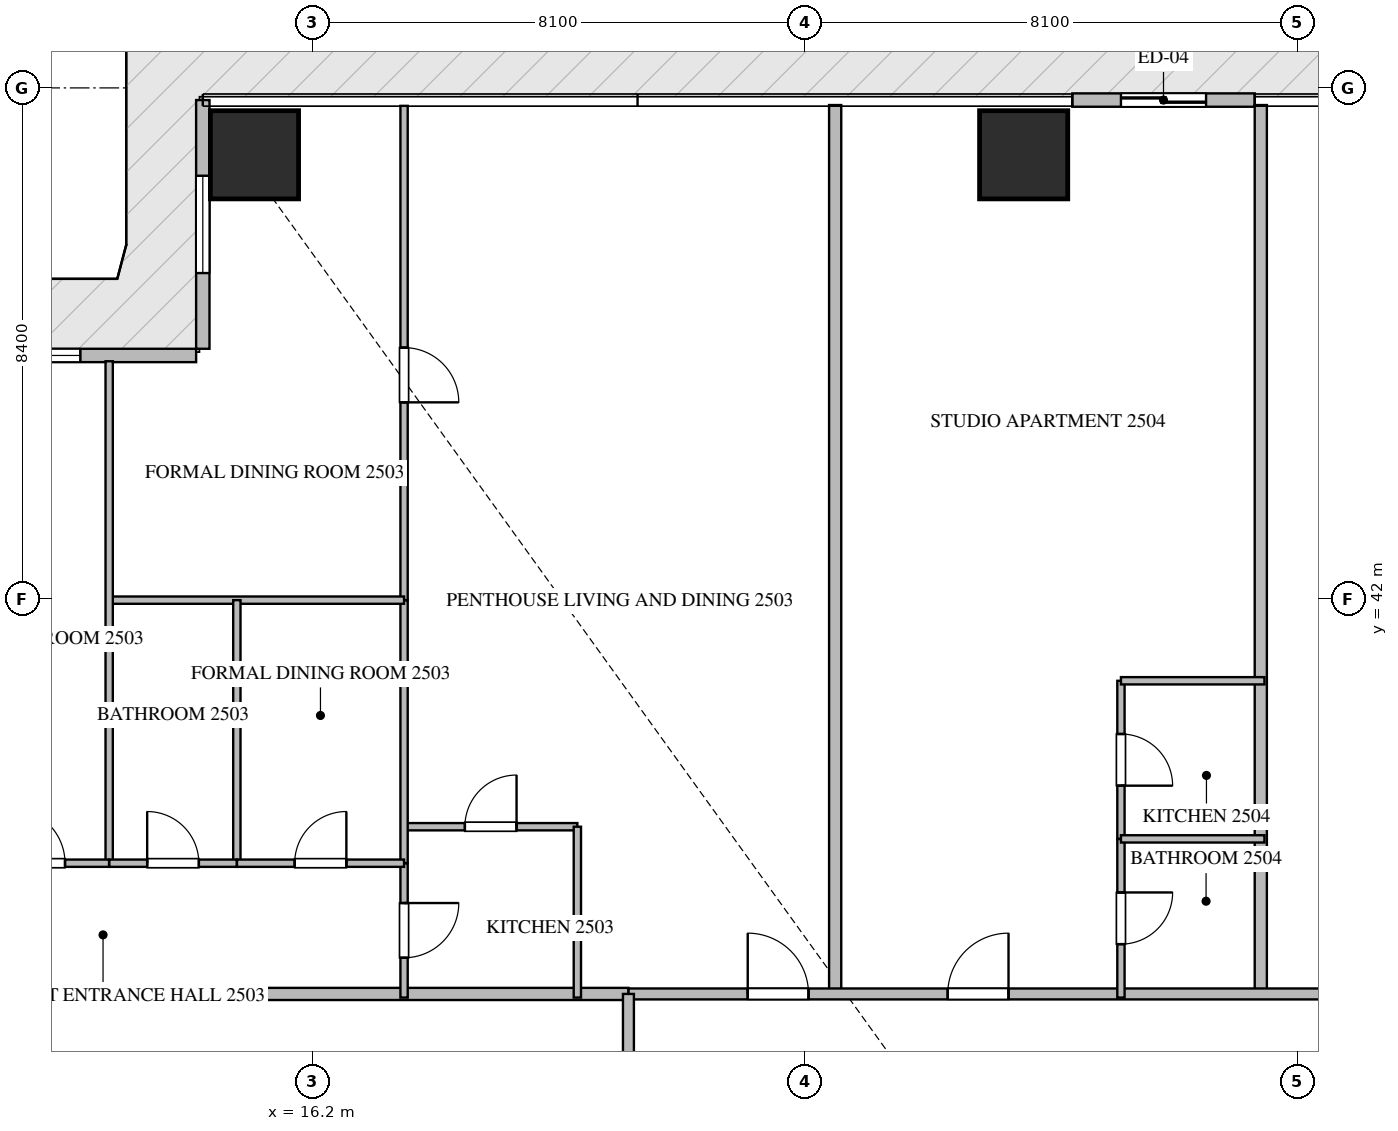
"""IFC4 building model, lengths in metres.
Left out: names, types, materials, properties, quantities, classifications, styles, units other than length and angle.
Written with IfcOpenShell. Run it as: python <this file> out.ifc"""

import sys

from ifc_helpers import new_model, si_unit, direction, frame, frame_2d, origin, origin_2d, place, context, subcontext, project, spatial, rectangle, extrude, source, transform, mapped, element, fill, save


model = new_model("IFC4")
c1 = context("Model", 3, precision=1e-05, world=origin(), true_north=direction((0.0, 1.0)))
c2 = subcontext(c1, "Body", "Model", "MODEL_VIEW")
j1 = project(units=[si_unit("LENGTHUNIT", "METRE"), si_unit("PLANEANGLEUNIT", "RADIAN")], contexts=[c1])
p1 = place(None, origin())
s1 = spatial("IfcSite", under=j1, at=p1, CompositionType="ELEMENT")
p2 = place(p1, origin())
s2 = spatial("IfcBuilding", under=s1, at=p2, CompositionType="ELEMENT")
p3 = place(p2, frame((0.0, 0.0, 101.7)))
s3 = spatial("IfcBuildingStorey", under=s2, at=p3, CompositionType="ELEMENT", Elevation=101.7)
m1 = source(origin(), c2, "Body", "SweptSolid", [
    extrude(rectangle(XDim=1.45, YDim=1.45, at=origin_2d()), origin(), (0.0, 0.0, 1.0), 3.75),
])
for number, where, z_axis, x_axis in (
    (1, (15.25, 49.3, -0.26), (0.0, 0.0, 1.0), (1.0, 0.0, 0.0)),
    (2, (27.9, 49.3, -0.26), (0.0, 0.0, 1.0), (1.0, 0.0, 0.0)),
):
    element("IfcColumn", number, at=place(p3, frame(where, z_axis=z_axis, x_axis=x_axis)), inside=s3, PredefinedType="COLUMN", context=c2, shape_type="MappedRepresentation", body=[
        mapped(m1, transform((0.0, 0.0, 0.0), scale=1.0)),
    ])
p4 = place(p3, frame((31.7, 50.2, 0.0), z_axis=(0.0, 0.0, 1.0), x_axis=(-1.0, 0.0, 0.0)))
e3 = element("IfcWall", 3, at=p4, inside=s3, PredefinedType="ELEMENTEDWALL", context=c2, shape_type="SweptSolid", body=[
    extrude(rectangle(XDim=3.0, YDim=0.22, at=frame_2d((1.5, 0.0))), origin(), (0.0, 0.0, 1.0), 3.475),
])
p5 = place(p4, frame((0.8, 0.0, 0.0)))
e4 = element("IfcOpeningElement", 4, at=p5, cuts=e3, PredefinedType="OPENING", context=c2, shape_type="SweptSolid", body=[
    extrude(rectangle(XDim=1.4, YDim=2.25, at=frame_2d((0.7, 1.125))), frame((0.0, 0.12, 0.0), z_axis=(0.0, -1.0, 0.0), x_axis=(1.0, 0.0, 0.0)), (0.0, 0.0, 1.0), 0.24),
])
p6 = place(p3, frame((14.4, 50.2, 0.0), z_axis=(0.0, 0.0, 1.0), x_axis=(0.0, -1.0, 0.0)))
e5 = element("IfcWall", 5, at=p6, inside=s3, PredefinedType="ELEMENTEDWALL", context=c2, shape_type="SweptSolid", body=[
    extrude(rectangle(XDim=4.09, YDim=0.22, at=frame_2d((2.045, 0.0))), origin(), (0.0, 0.0, 1.0), 3.475),
])
p7 = place(p6, frame((1.245, 0.0, 0.65)))
e6 = element("IfcOpeningElement", 6, at=p7, cuts=e5, PredefinedType="OPENING", context=c2, shape_type="SweptSolid", body=[
    extrude(rectangle(XDim=1.6, YDim=2.1, at=frame_2d((0.8, 1.05))), frame((0.0, 0.12, 0.0), z_axis=(0.0, -1.0, 0.0), x_axis=(1.0, 0.0, 0.0)), (0.0, 0.0, 1.0), 0.24),
])
p8 = place(p3, frame((14.29, 46.0, 0.0), z_axis=(0.0, 0.0, 1.0), x_axis=(-1.0, 0.0, 0.0)))
e7 = element("IfcWall", 7, at=p8, inside=s3, PredefinedType="ELEMENTEDWALL", context=c2, shape_type="SweptSolid", body=[
    extrude(rectangle(XDim=3.98, YDim=0.22, at=frame_2d((1.99, 0.0))), origin(), (0.0, 0.0, 1.0), 3.475),
])
p9 = place(p8, frame((1.904, 0.0, 0.65)))
e8 = element("IfcOpeningElement", 8, at=p9, cuts=e7, PredefinedType="OPENING", context=c2, shape_type="SweptSolid", body=[
    extrude(rectangle(XDim=1.6, YDim=2.1, at=frame_2d((0.8, 1.05))), frame((0.0, 0.12, 0.0), z_axis=(0.0, -1.0, 0.0), x_axis=(1.0, 0.0, 0.0)), (0.0, 0.0, 1.0), 0.24),
])
for number, where, z_axis, x_axis in (
    (9, (24.8, 35.5, 0.0), (0.0, 0.0, 1.0), (0.0, 1.0, 0.0)),
    (10, (31.8, 35.5, 0.0), (0.0, 0.0, 1.0), (0.0, 1.0, 0.0)),
):
    element("IfcWall", number, at=place(p3, frame(where, z_axis=z_axis, x_axis=x_axis)), inside=s3, PredefinedType="PARTITIONING", context=c2, shape_type="SweptSolid", body=[
        extrude(rectangle(XDim=14.618, YDim=0.2, at=frame_2d((7.309, 0.0))), origin(), (0.0, 0.0, 1.0), 3.49),
    ])
p10 = place(p3, frame((6.082, 35.5, 0.0), z_axis=(0.0, 0.0, 1.0), x_axis=(1.0, 0.0, 0.0)))
e11 = element("IfcWall", 11, at=p10, inside=s3, PredefinedType="PARTITIONING", context=c2, shape_type="SweptSolid", body=[
    extrude(rectangle(XDim=15.318, YDim=0.2, at=frame_2d((7.659, 0.0))), origin(), (0.0, 0.0, 1.0), 3.49),
])
p11 = place(p3, frame((21.402, 35.5, 0.0), z_axis=(0.0, 0.0, 1.0), x_axis=(1.0, 0.0, 0.0)))
e12 = element("IfcWall", 12, at=p11, inside=s3, PredefinedType="PARTITIONING", context=c2, shape_type="SweptSolid", body=[
    extrude(rectangle(XDim=21.996, YDim=0.18, at=frame_2d((10.998, 0.0))), origin(), (0.0, 0.0, 1.0), 3.49),
])
p12 = place(p11, frame((1.96, 0.0, 0.0)))
e13 = element("IfcOpeningElement", 13, at=p12, cuts=e12, PredefinedType="OPENING", context=c2, shape_type="SweptSolid", body=[
    extrude(rectangle(XDim=1.0, YDim=2.15, at=frame_2d((0.5, 1.075))), frame((0.0, 0.1, 0.0), z_axis=(0.0, -1.0, 0.0), x_axis=(1.0, 0.0, 0.0)), (0.0, 0.0, 1.0), 0.2),
])
p13 = place(p11, frame((5.249, 0.0, 0.0)))
e14 = element("IfcOpeningElement", 14, at=p13, cuts=e12, PredefinedType="OPENING", context=c2, shape_type="SweptSolid", body=[
    extrude(rectangle(XDim=1.0, YDim=2.15, at=frame_2d((0.5, 1.075))), frame((0.0, 0.1, 0.0), z_axis=(0.0, -1.0, 0.0), x_axis=(1.0, 0.0, 0.0)), (0.0, 0.0, 1.0), 0.2),
])
p14 = place(p11, frame((11.653, 0.0, 0.0)))
e15 = element("IfcOpeningElement", 15, at=p14, cuts=e12, PredefinedType="OPENING", context=c2, shape_type="SweptSolid", body=[
    extrude(rectangle(XDim=1.0, YDim=2.15, at=frame_2d((0.5, 1.075))), frame((0.0, 0.1, 0.0), z_axis=(0.0, -1.0, 0.0), x_axis=(1.0, 0.0, 0.0)), (0.0, 0.0, 1.0), 0.2),
])
p15 = place(p11, frame((18.896, 0.0, 0.0)))
e16 = element("IfcOpeningElement", 16, at=p15, cuts=e12, PredefinedType="OPENING", context=c2, shape_type="SweptSolid", body=[
    extrude(rectangle(XDim=1.0, YDim=2.15, at=frame_2d((0.5, 1.075))), frame((0.0, 0.1, 0.0), z_axis=(0.0, -1.0, 0.0), x_axis=(1.0, 0.0, 0.0)), (0.0, 0.0, 1.0), 0.2),
])
p16 = place(p3, frame((21.4, 14.9, 0.0), z_axis=(0.0, 0.0, 1.0), x_axis=(0.0, 1.0, 0.0)))
e17 = element("IfcWall", 17, at=p16, inside=s3, PredefinedType="PARTITIONING", context=c2, shape_type="SweptSolid", body=[
    extrude(rectangle(XDim=20.6, YDim=0.18, at=frame_2d((10.3, 0.0))), origin(), (0.0, 0.0, 1.0), 3.49),
])
p17 = place(p16, frame((17.64, 0.0, 0.0)))
e18 = element("IfcOpeningElement", 18, at=p17, cuts=e17, PredefinedType="OPENING", context=c2, shape_type="SweptSolid", body=[
    extrude(rectangle(XDim=1.0, YDim=2.15, at=frame_2d((0.5, 1.075))), frame((0.0, 0.1, 0.0), z_axis=(0.0, -1.0, 0.0), x_axis=(1.0, 0.0, 0.0)), (0.0, 0.0, 1.0), 0.2),
])
p18 = place(p3, frame((17.71, 38.25, 0.0), z_axis=(0.0, 0.0, 1.0), x_axis=(1.0, 0.0, 0.0)))
e19 = element("IfcWall", 19, at=p18, inside=s3, PredefinedType="PARTITIONING", context=c2, shape_type="SweptSolid", body=[
    extrude(rectangle(XDim=2.85, YDim=0.12, at=frame_2d((1.425, 0.0))), origin(), (0.0, 0.0, 1.0), 3.49),
])
p19 = place(p18, frame((1.0, 0.0, 0.0)))
e20 = element("IfcOpeningElement", 20, at=p19, cuts=e19, PredefinedType="OPENING", context=c2, shape_type="SweptSolid", body=[
    extrude(rectangle(XDim=0.85, YDim=2.1, at=frame_2d((0.425, 1.05))), frame((0.0, 0.07, 0.0), z_axis=(0.0, -1.0, 0.0), x_axis=(1.0, 0.0, 0.0)), (0.0, 0.0, 1.0), 0.14),
])
p20 = place(p3, frame((20.56, 38.25, 0.0), z_axis=(0.0, 0.0, 1.0), x_axis=(0.0, -1.0, 0.0)))
e21 = element("IfcWall", 21, at=p20, inside=s3, PredefinedType="PARTITIONING", context=c2, shape_type="SweptSolid", body=[
    extrude(rectangle(XDim=2.81, YDim=0.12, at=frame_2d((1.405, 0.0))), origin(), (0.0, 0.0, 1.0), 3.49),
])
p21 = place(p3, frame((17.71, 37.65, 0.0), z_axis=(0.0, 0.0, 1.0), x_axis=(0.0, -1.0, 0.0)))
e22 = element("IfcWall", 22, at=p21, inside=s3, PredefinedType="PARTITIONING", context=c2, shape_type="SweptSolid", body=[
    extrude(rectangle(XDim=2.21, YDim=0.12, at=frame_2d((1.105, 0.0))), origin(), (0.0, 0.0, 1.0), 3.49),
])
p22 = place(p21, frame((0.655, 0.0, 0.0)))
e23 = element("IfcOpeningElement", 23, at=p22, cuts=e22, PredefinedType="OPENING", context=c2, shape_type="SweptSolid", body=[
    extrude(rectangle(XDim=0.9, YDim=2.1, at=frame_2d((0.45, 1.05))), frame((0.0, 0.07, 0.0), z_axis=(0.0, -1.0, 0.0), x_axis=(1.0, 0.0, 0.0)), (0.0, 0.0, 1.0), 0.14),
])
p23 = place(p3, frame((17.71, 50.105, 0.0), z_axis=(0.0, 0.0, 1.0), x_axis=(0.0, -1.0, 0.0)))
e24 = element("IfcWall", 24, at=p23, inside=s3, PredefinedType="PARTITIONING", context=c2, shape_type="SweptSolid", body=[
    extrude(rectangle(XDim=8.129, YDim=0.12, at=frame_2d((4.064, 0.0))), origin(), (0.0, 0.0, 1.0), 3.49),
])
p24 = place(p23, frame((3.976, 0.0, 0.0)))
e25 = element("IfcOpeningElement", 25, at=p24, cuts=e24, PredefinedType="OPENING", context=c2, shape_type="SweptSolid", body=[
    extrude(rectangle(XDim=0.9, YDim=2.1, at=frame_2d((0.45, 1.05))), frame((0.0, 0.07, 0.0), z_axis=(0.0, -1.0, 0.0), x_axis=(1.0, 0.0, 0.0)), (0.0, 0.0, 1.0), 0.14),
])
p25 = place(p3, frame((17.71, 41.974, 0.0), z_axis=(0.0, 0.0, 1.0), x_axis=(0.0, -1.0, 0.0)))
e26 = element("IfcWall", 26, at=p25, inside=s3, PredefinedType="PARTITIONING", context=c2, shape_type="SweptSolid", body=[
    extrude(rectangle(XDim=4.322, YDim=0.12, at=frame_2d((2.161, 0.0))), origin(), (0.0, 0.0, 1.0), 3.49),
])
p26 = place(p3, frame((12.86, 41.976, 0.0), z_axis=(0.0, 0.0, 1.0), x_axis=(1.0, 0.0, 0.0)))
e27 = element("IfcWall", 27, at=p26, inside=s3, PredefinedType="PARTITIONING", context=c2, shape_type="SweptSolid", body=[
    extrude(rectangle(XDim=4.85, YDim=0.12, at=frame_2d((2.425, 0.0))), origin(), (0.0, 0.0, 1.0), 3.49),
])
p27 = place(p3, frame((12.86, 45.905, 0.0), z_axis=(0.0, 0.0, 1.0), x_axis=(0.0, -1.0, 0.0)))
e28 = element("IfcWall", 28, at=p27, inside=s3, PredefinedType="PARTITIONING", context=c2, shape_type="SweptSolid", body=[
    extrude(rectangle(XDim=8.255, YDim=0.12, at=frame_2d((4.127, 0.0))), origin(), (0.0, 0.0, 1.0), 3.49),
])
p28 = place(p3, frame((14.96, 41.976, 0.0), z_axis=(0.0, 0.0, 1.0), x_axis=(0.0, -1.0, 0.0)))
e29 = element("IfcWall", 29, at=p28, inside=s3, PredefinedType="PARTITIONING", context=c2, shape_type="SweptSolid", body=[
    extrude(rectangle(XDim=4.326, YDim=0.12, at=frame_2d((2.163, 0.0))), origin(), (0.0, 0.0, 1.0), 3.49),
])
p29 = place(p3, frame((12.86, 37.65, 0.0), z_axis=(0.0, 0.0, 1.0), x_axis=(1.0, 0.0, 0.0)))
e30 = element("IfcWall", 30, at=p29, inside=s3, PredefinedType="PARTITIONING", context=c2, shape_type="SweptSolid", body=[
    extrude(rectangle(XDim=2.1, YDim=0.12, at=frame_2d((1.05, 0.0))), origin(), (0.0, 0.0, 1.0), 3.49),
])
p30 = place(p29, frame((0.625, 0.0, 0.0)))
e31 = element("IfcOpeningElement", 31, at=p30, cuts=e30, PredefinedType="OPENING", context=c2, shape_type="SweptSolid", body=[
    extrude(rectangle(XDim=0.85, YDim=2.1, at=frame_2d((0.425, 1.05))), frame((0.0, 0.07, 0.0), z_axis=(0.0, -1.0, 0.0), x_axis=(1.0, 0.0, 0.0)), (0.0, 0.0, 1.0), 0.14),
])
p31 = place(p3, frame((14.962, 37.65, 0.0), z_axis=(0.0, 0.0, 1.0), x_axis=(1.0, 0.0, 0.0)))
e32 = element("IfcWall", 32, at=p31, inside=s3, PredefinedType="PARTITIONING", context=c2, shape_type="SweptSolid", body=[
    extrude(rectangle(XDim=2.748, YDim=0.12, at=frame_2d((1.374, 0.0))), origin(), (0.0, 0.0, 1.0), 3.49),
])
p32 = place(p31, frame((0.949, 0.0, 0.0)))
e33 = element("IfcOpeningElement", 33, at=p32, cuts=e32, PredefinedType="OPENING", context=c2, shape_type="SweptSolid", body=[
    extrude(rectangle(XDim=0.85, YDim=2.1, at=frame_2d((0.425, 1.05))), frame((0.0, 0.07, 0.0), z_axis=(0.0, -1.0, 0.0), x_axis=(1.0, 0.0, 0.0)), (0.0, 0.0, 1.0), 0.14),
])
p33 = place(p3, frame((10.51, 37.65, 0.0), z_axis=(0.0, 0.0, 1.0), x_axis=(1.0, 0.0, 0.0)))
e34 = element("IfcWall", 34, at=p33, inside=s3, PredefinedType="PARTITIONING", context=c2, shape_type="SweptSolid", body=[
    extrude(rectangle(XDim=2.348, YDim=0.12, at=frame_2d((1.174, 0.0))), origin(), (0.0, 0.0, 1.0), 3.49),
])
p34 = place(p33, frame((0.724, 0.0, 0.0)))
e35 = element("IfcOpeningElement", 35, at=p34, cuts=e34, PredefinedType="OPENING", context=c2, shape_type="SweptSolid", body=[
    extrude(rectangle(XDim=0.9, YDim=2.1, at=frame_2d((0.45, 1.05))), frame((0.0, 0.07, 0.0), z_axis=(0.0, -1.0, 0.0), x_axis=(1.0, 0.0, 0.0)), (0.0, 0.0, 1.0), 0.14),
])
p35 = place(p3, frame((29.5, 40.65, 0.0), z_axis=(0.0, 0.0, 1.0), x_axis=(0.0, -1.0, 0.0)))
e36 = element("IfcWall", 36, at=p35, inside=s3, PredefinedType="PARTITIONING", context=c2, shape_type="SweptSolid", body=[
    extrude(rectangle(XDim=2.6, YDim=0.12, at=frame_2d((1.3, 0.0))), origin(), (0.0, 0.0, 1.0), 3.49),
])
p36 = place(p35, frame((0.875, 0.0, 0.0)))
e37 = element("IfcOpeningElement", 37, at=p36, cuts=e36, PredefinedType="OPENING", context=c2, shape_type="SweptSolid", body=[
    extrude(rectangle(XDim=0.85, YDim=2.1, at=frame_2d((0.425, 1.05))), frame((0.0, 0.07, 0.0), z_axis=(0.0, -1.0, 0.0), x_axis=(1.0, 0.0, 0.0)), (0.0, 0.0, 1.0), 0.14),
])
p37 = place(p3, frame((29.5, 38.048, 0.0), z_axis=(0.0, 0.0, 1.0), x_axis=(0.0, -1.0, 0.0)))
e38 = element("IfcWall", 38, at=p37, inside=s3, PredefinedType="PARTITIONING", context=c2, shape_type="SweptSolid", body=[
    extrude(rectangle(XDim=2.608, YDim=0.12, at=frame_2d((1.304, 0.0))), origin(), (0.0, 0.0, 1.0), 3.49),
])
p38 = place(p37, frame((0.879, 0.0, 0.0)))
e39 = element("IfcOpeningElement", 39, at=p38, cuts=e38, PredefinedType="OPENING", context=c2, shape_type="SweptSolid", body=[
    extrude(rectangle(XDim=0.85, YDim=2.1, at=frame_2d((0.425, 1.05))), frame((0.0, 0.07, 0.0), z_axis=(0.0, -1.0, 0.0), x_axis=(1.0, 0.0, 0.0)), (0.0, 0.0, 1.0), 0.14),
])
for number, where, z_axis, x_axis in (
    (40, (29.5, 38.05, 0.0), (0.0, 0.0, 1.0), (1.0, 0.0, 0.0)),
    (41, (29.5, 40.65, 0.0), (0.0, 0.0, 1.0), (1.0, 0.0, 0.0)),
):
    element("IfcWall", number, at=place(p3, frame(where, z_axis=z_axis, x_axis=x_axis)), inside=s3, PredefinedType="PARTITIONING", context=c2, shape_type="SweptSolid", body=[
        extrude(rectangle(XDim=2.36, YDim=0.12, at=frame_2d((1.18, 0.0))), origin(), (0.0, 0.0, 1.0), 3.49),
    ])
m2 = source(origin(), c2, "Body", "SweptSolid", [
    extrude(rectangle(XDim=1.4, YDim=2.25, at=frame_2d((0.7, 1.125))), frame((0.0, 0.025, 0.0), z_axis=(0.0, -1.0, 0.0), x_axis=(1.0, 0.0, 0.0)), (0.0, 0.0, 1.0), 0.05),
])
p39 = place(p5, origin())
e42 = element("IfcDoor", 42, at=p39, inside=s3, OperationType="SLIDING_TO_LEFT", PredefinedType="DOOR", context=c2, shape_type="MappedRepresentation", body=[
    mapped(m2, transform((0.0, 0.0, 0.0), scale=1.0)),
])
fill(e4, e42)
m3 = source(origin(), c2, "Body", "SweptSolid", [
    extrude(rectangle(XDim=1.6, YDim=2.1, at=frame_2d((0.8, 1.05))), frame((0.0, 0.03, 0.0), z_axis=(0.0, -1.0, 0.0), x_axis=(1.0, 0.0, 0.0)), (0.0, 0.0, 1.0), 0.06),
])
p40 = place(p7, origin())
e43 = element("IfcWindow", 43, at=p40, inside=s3, PartitioningType="SINGLE_PANEL", PredefinedType="WINDOW", context=c2, shape_type="MappedRepresentation", body=[
    mapped(m3, transform((0.0, 0.0, 0.0), scale=1.0)),
])
fill(e6, e43)
p41 = place(p9, origin())
e44 = element("IfcWindow", 44, at=p41, inside=s3, PartitioningType="SINGLE_PANEL", PredefinedType="WINDOW", context=c2, shape_type="MappedRepresentation", body=[
    mapped(m3, transform((0.0, 0.0, 0.0), scale=1.0)),
])
fill(e8, e44)
m4 = source(origin(), c2, "Body", "SweptSolid", [
    extrude(rectangle(XDim=1.0, YDim=2.15, at=frame_2d((0.5, 1.075))), frame((0.0, 0.025, 0.0), z_axis=(0.0, -1.0, 0.0), x_axis=(1.0, 0.0, 0.0)), (0.0, 0.0, 1.0), 0.05),
])
p42 = place(p12, origin())
e45 = element("IfcDoor", 45, at=p42, inside=s3, OperationType="SINGLE_SWING_LEFT", PredefinedType="DOOR", context=c2, shape_type="MappedRepresentation", body=[
    mapped(m4, transform((0.0, 0.0, 0.0), scale=1.0)),
])
fill(e13, e45)
p43 = place(p13, origin())
e46 = element("IfcDoor", 46, at=p43, inside=s3, OperationType="SINGLE_SWING_RIGHT", PredefinedType="DOOR", context=c2, shape_type="MappedRepresentation", body=[
    mapped(m4, transform((0.0, 0.0, 0.0), scale=1.0)),
])
fill(e14, e46)
m5 = source(origin(), c2, "Body", "SweptSolid", [
    extrude(rectangle(XDim=0.85, YDim=2.1, at=frame_2d((0.425, 1.05))), frame((0.0, 0.025, 0.0), z_axis=(0.0, -1.0, 0.0), x_axis=(1.0, 0.0, 0.0)), (0.0, 0.0, 1.0), 0.05),
])
p44 = place(p19, origin())
e47 = element("IfcDoor", 47, at=p44, inside=s3, OperationType="SINGLE_SWING_RIGHT", PredefinedType="DOOR", context=c2, shape_type="MappedRepresentation", body=[
    mapped(m5, transform((0.0, 0.0, 0.0), scale=1.0)),
])
fill(e20, e47)
m6 = source(origin(), c2, "Body", "SweptSolid", [
    extrude(rectangle(XDim=0.9, YDim=2.1, at=frame_2d((0.45, 1.05))), frame((0.0, 0.025, 0.0), z_axis=(0.0, -1.0, 0.0), x_axis=(1.0, 0.0, 0.0)), (0.0, 0.0, 1.0), 0.05),
])
p45 = place(p22, origin())
e48 = element("IfcDoor", 48, at=p45, inside=s3, OperationType="SINGLE_SWING_LEFT", PredefinedType="DOOR", context=c2, shape_type="MappedRepresentation", body=[
    mapped(m6, transform((0.0, 0.0, 0.0), scale=1.0)),
])
fill(e23, e48)
p46 = place(p24, origin())
e49 = element("IfcDoor", 49, at=p46, inside=s3, OperationType="SINGLE_SWING_RIGHT", PredefinedType="DOOR", context=c2, shape_type="MappedRepresentation", body=[
    mapped(m6, transform((0.0, 0.0, 0.0), scale=1.0)),
])
fill(e25, e49)
p47 = place(p30, origin())
e50 = element("IfcDoor", 50, at=p47, inside=s3, OperationType="SINGLE_SWING_LEFT", PredefinedType="DOOR", context=c2, shape_type="MappedRepresentation", body=[
    mapped(m5, transform((0.0, 0.0, 0.0), scale=1.0)),
])
fill(e31, e50)
p48 = place(p32, origin())
e51 = element("IfcDoor", 51, at=p48, inside=s3, OperationType="SINGLE_SWING_RIGHT", PredefinedType="DOOR", context=c2, shape_type="MappedRepresentation", body=[
    mapped(m5, transform((0.0, 0.0, 0.0), scale=1.0)),
])
fill(e33, e51)
p49 = place(p34, origin())
e52 = element("IfcDoor", 52, at=p49, inside=s3, OperationType="SINGLE_SWING_LEFT", PredefinedType="DOOR", context=c2, shape_type="MappedRepresentation", body=[
    mapped(m6, transform((0.0, 0.0, 0.0), scale=1.0)),
])
fill(e35, e52)
p50 = place(p36, origin())
e53 = element("IfcDoor", 53, at=p50, inside=s3, OperationType="SINGLE_SWING_RIGHT", PredefinedType="DOOR", context=c2, shape_type="MappedRepresentation", body=[
    mapped(m5, transform((0.0, 0.0, 0.0), scale=1.0)),
])
fill(e37, e53)
p51 = place(p38, origin())
e54 = element("IfcDoor", 54, at=p51, inside=s3, OperationType="SINGLE_SWING_LEFT", PredefinedType="DOOR", context=c2, shape_type="MappedRepresentation", body=[
    mapped(m5, transform((0.0, 0.0, 0.0), scale=1.0)),
])
fill(e39, e54)
save(model, sys.argv[1])
